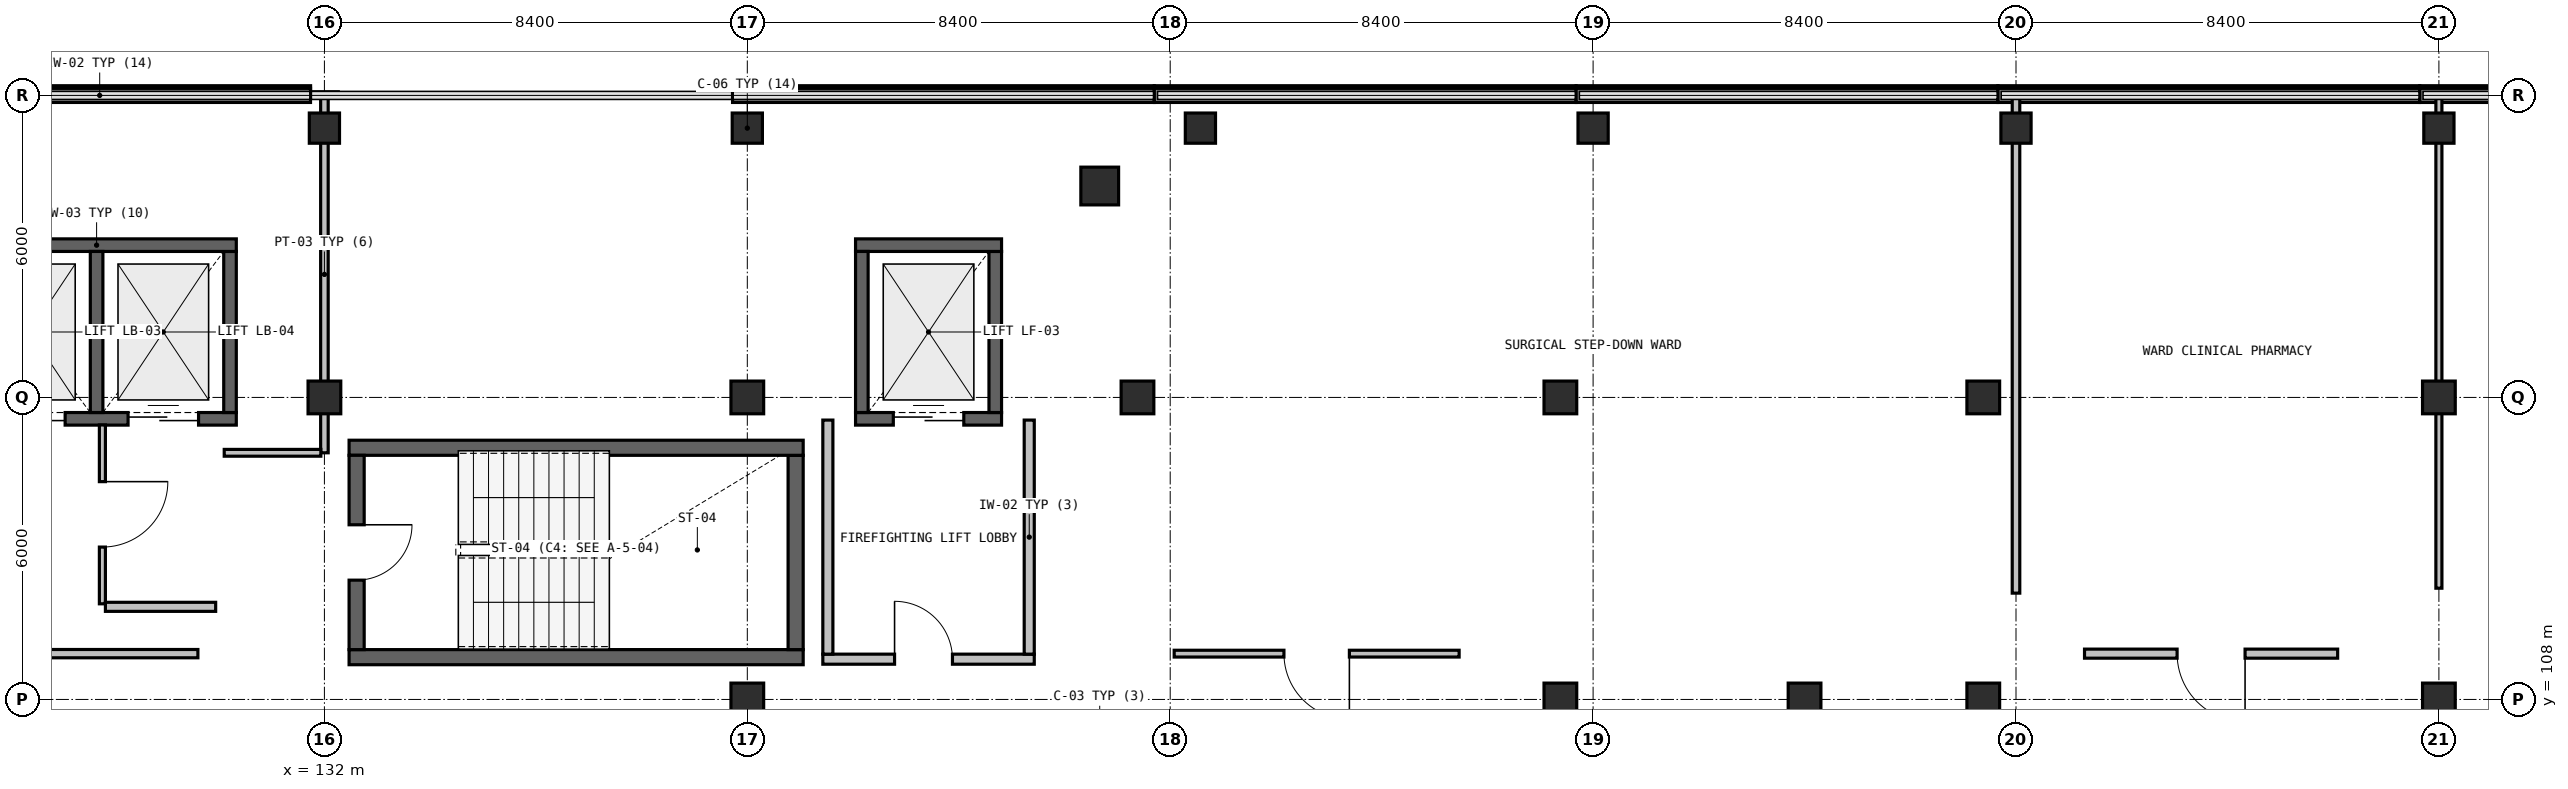
"""IFC4 building model, lengths in metres.
Left out: names, types, materials, properties, quantities, classifications, styles, units other than length and angle.
Written with IfcOpenShell. Run it as: python <this file> out.ifc"""

import sys

from ifc_helpers import new_model, si_unit, direction, frame, frame_2d, origin, origin_2d, place, context, subcontext, project, spatial, rectangle, extrude, element, fill, save


model = new_model("IFC4")
c1 = context("Model", 3, precision=1e-05, world=origin(), true_north=direction((0.0, 1.0)))
c2 = subcontext(c1, "Body", "Model", "MODEL_VIEW")
j1 = project(units=[si_unit("LENGTHUNIT", "METRE"), si_unit("PLANEANGLEUNIT", "RADIAN")], contexts=[c1])
p1 = place(None, origin())
s1 = spatial("IfcSite", under=j1, at=p1, CompositionType="ELEMENT")
p2 = place(p1, origin())
s2 = spatial("IfcBuilding", under=s1, at=p2, CompositionType="ELEMENT")
p3 = place(p2, frame((0.0, 0.0, 23.25)))
s3 = spatial("IfcBuildingStorey", under=s2, at=p3, CompositionType="ELEMENT", Elevation=23.25)
p4 = place(p3, frame((147.4, 118.2, 0.0), z_axis=(0.0, 0.0, 1.0), x_axis=(1.0, 0.0, 0.0)))
e1 = element("IfcColumn", 1, at=p4, inside=s3, PredefinedType="COLUMN", context=c2, shape_type="SweptSolid", body=[
    extrude(rectangle(XDim=0.75, YDim=0.75, at=origin_2d()), origin(), (0.0, 0.0, 1.0), 4.05),
])
p5 = place(p3, frame((161.4, 108.0, 0.0), z_axis=(0.0, 0.0, 1.0), x_axis=(1.0, 0.0, 0.0)))
e2 = element("IfcColumn", 2, at=p5, inside=s3, PredefinedType="COLUMN", context=c2, shape_type="SweptSolid", body=[
    extrude(rectangle(XDim=0.65, YDim=0.65, at=origin_2d()), origin(), (0.0, 0.0, 1.0), 4.05),
])
for number, where, z_axis, x_axis in (
    (3, (149.4, 119.35, 0.0), (0.0, 0.0, 1.0), (1.0, 0.0, 0.0)),
    (4, (157.2, 119.35, 0.0), (0.0, 0.0, 1.0), (1.0, 0.0, 0.0)),
    (5, (165.6, 119.35, 0.0), (0.0, 0.0, 1.0), (1.0, 0.0, 0.0)),
    (6, (174.0, 119.35, 0.0), (0.0, 0.0, 1.0), (1.0, 0.0, 0.0)),
):
    element("IfcColumn", number, at=place(p3, frame(where, z_axis=z_axis, x_axis=x_axis)), inside=s3, PredefinedType="COLUMN", context=c2, shape_type="SweptSolid", body=[
        extrude(rectangle(XDim=0.6, YDim=0.6, at=origin_2d()), origin(), (0.0, 0.0, 1.0), 3.775),
    ])
p6 = place(p3, frame((132.0, 114.0, 0.0), z_axis=(0.0, 0.0, 1.0), x_axis=(1.0, 0.0, 0.0)))
e7 = element("IfcColumn", 7, at=p6, inside=s3, PredefinedType="COLUMN", context=c2, shape_type="SweptSolid", body=[
    extrude(rectangle(XDim=0.65, YDim=0.65, at=origin_2d()), origin(), (0.0, 0.0, 1.0), 4.05),
])
p7 = place(p3, frame((132.0, 119.35, 0.0), z_axis=(0.0, 0.0, 1.0), x_axis=(1.0, 0.0, 0.0)))
e8 = element("IfcColumn", 8, at=p7, inside=s3, PredefinedType="COLUMN", context=c2, shape_type="SweptSolid", body=[
    extrude(rectangle(XDim=0.6, YDim=0.6, at=origin_2d()), origin(), (0.0, 0.0, 1.0), 4.05),
])
for number, where, z_axis, x_axis in (
    (9, (140.4, 108.0, 0.0), (0.0, 0.0, 1.0), (1.0, 0.0, 0.0)),
    (10, (140.4, 114.0, 0.0), (0.0, 0.0, 1.0), (1.0, 0.0, 0.0)),
):
    element("IfcColumn", number, at=place(p3, frame(where, z_axis=z_axis, x_axis=x_axis)), inside=s3, PredefinedType="COLUMN", context=c2, shape_type="SweptSolid", body=[
        extrude(rectangle(XDim=0.65, YDim=0.65, at=origin_2d()), origin(), (0.0, 0.0, 1.0), 4.05),
    ])
p8 = place(p3, frame((140.4, 119.35, 0.0), z_axis=(0.0, 0.0, 1.0), x_axis=(1.0, 0.0, 0.0)))
e11 = element("IfcColumn", 11, at=p8, inside=s3, PredefinedType="COLUMN", context=c2, shape_type="SweptSolid", body=[
    extrude(rectangle(XDim=0.6, YDim=0.6, at=origin_2d()), origin(), (0.0, 0.0, 1.0), 4.05),
])
for number, where, z_axis, x_axis in (
    (12, (148.15, 114.0, 0.0), (0.0, 0.0, 1.0), (1.0, 0.0, 0.0)),
    (13, (156.55, 108.0, 0.0), (0.0, 0.0, 1.0), (1.0, 0.0, 0.0)),
    (14, (156.55, 114.0, 0.0), (0.0, 0.0, 1.0), (1.0, 0.0, 0.0)),
    (15, (164.95, 108.0, 0.0), (0.0, 0.0, 1.0), (1.0, 0.0, 0.0)),
    (16, (164.95, 114.0, 0.0), (0.0, 0.0, 1.0), (1.0, 0.0, 0.0)),
    (17, (174.0, 108.0, 0.0), (0.0, 0.0, 1.0), (1.0, 0.0, 0.0)),
    (18, (174.0, 114.0, 0.0), (0.0, 0.0, 1.0), (1.0, 0.0, 0.0)),
):
    element("IfcColumn", number, at=place(p3, frame(where, z_axis=z_axis, x_axis=x_axis)), inside=s3, PredefinedType="COLUMN", context=c2, shape_type="SweptSolid", body=[
        extrude(rectangle(XDim=0.65, YDim=0.65, at=origin_2d()), origin(), (0.0, 0.0, 1.0), 4.05),
    ])
p9 = place(p3, frame((123.349, 120.0, 0.0), z_axis=(0.0, 0.0, 1.0), x_axis=(1.0, 0.0, 0.0)))
e19 = element("IfcWall", 19, at=p9, inside=s3, PredefinedType="SOLIDWALL", context=c2, shape_type="SweptSolid", body=[
    extrude(rectangle(XDim=8.375, YDim=0.28, at=frame_2d((4.188, 0.0))), origin(), (0.0, 0.0, 1.0), 0.94),
])
p10 = place(p3, frame((140.107, 120.0, 0.0), z_axis=(0.0, 0.0, 1.0), x_axis=(1.0, 0.0, 0.0)))
e20 = element("IfcWall", 20, at=p10, inside=s3, PredefinedType="SOLIDWALL", context=c2, shape_type="SweptSolid", body=[
    extrude(rectangle(XDim=8.374, YDim=0.28, at=frame_2d((4.187, 0.0))), origin(), (0.0, 0.0, 1.0), 0.94),
])
for number, where, z_axis, x_axis in (
    (21, (148.485, 120.0, 0.0), (0.0, 0.0, 1.0), (1.0, 0.0, 0.0)),
    (22, (156.864, 120.0, 0.0), (0.0, 0.0, 1.0), (1.0, 0.0, 0.0)),
    (23, (165.243, 120.0, 0.0), (0.0, 0.0, 1.0), (1.0, 0.0, 0.0)),
):
    element("IfcWall", number, at=place(p3, frame(where, z_axis=z_axis, x_axis=x_axis)), inside=s3, PredefinedType="SOLIDWALL", context=c2, shape_type="SweptSolid", body=[
        extrude(rectangle(XDim=8.375, YDim=0.28, at=frame_2d((4.188, 0.0))), origin(), (0.0, 0.0, 1.0), 0.94),
    ])
p11 = place(p3, frame((173.622, 120.0, 0.0), z_axis=(0.0, 0.0, 1.0), x_axis=(1.0, 0.0, 0.0)))
e24 = element("IfcWall", 24, at=p11, inside=s3, PredefinedType="SOLIDWALL", context=c2, shape_type="SweptSolid", body=[
    extrude(rectangle(XDim=8.237, YDim=0.28, at=frame_2d((4.118, 0.0))), origin(), (0.0, 0.0, 1.0), 0.94),
])
p12 = place(p3, frame((132.49, 108.84, 0.0), z_axis=(0.0, 0.0, 1.0), x_axis=(1.0, 0.0, 0.0)))
e25 = element("IfcWall", 25, at=p12, inside=s3, PredefinedType="SHEAR", context=c2, shape_type="SweptSolid", body=[
    extrude(rectangle(XDim=9.02, YDim=0.3, at=frame_2d((4.51, 0.0))), origin(), (0.0, 0.0, 1.0), 3.775),
])
p13 = place(p3, frame((141.36, 108.99, 0.0), z_axis=(0.0, 0.0, 1.0), x_axis=(0.0, 1.0, 0.0)))
e26 = element("IfcWall", 26, at=p13, inside=s3, PredefinedType="SHEAR", context=c2, shape_type="SweptSolid", body=[
    extrude(rectangle(XDim=3.86, YDim=0.3, at=frame_2d((1.93, 0.0))), origin(), (0.0, 0.0, 1.0), 3.775),
])
p14 = place(p3, frame((141.51, 113.0, 0.0), z_axis=(0.0, 0.0, 1.0), x_axis=(-1.0, 0.0, 0.0)))
e27 = element("IfcWall", 27, at=p14, inside=s3, PredefinedType="SHEAR", context=c2, shape_type="SweptSolid", body=[
    extrude(rectangle(XDim=9.02, YDim=0.3, at=frame_2d((4.51, 0.0))), origin(), (0.0, 0.0, 1.0), 3.775),
])
p15 = place(p3, frame((132.64, 112.85, 0.0), z_axis=(0.0, 0.0, 1.0), x_axis=(0.0, -1.0, 0.0)))
e28 = element("IfcWall", 28, at=p15, inside=s3, PredefinedType="SHEAR", context=c2, shape_type="SweptSolid", body=[
    extrude(rectangle(XDim=3.86, YDim=0.3, at=frame_2d((1.93, 0.0))), origin(), (0.0, 0.0, 1.0), 3.775),
])
p16 = place(p15, frame((1.38, 0.0, 0.0)))
e29 = element("IfcOpeningElement", 29, at=p16, cuts=e28, PredefinedType="OPENING", context=c2, shape_type="SweptSolid", body=[
    extrude(rectangle(XDim=1.1, YDim=2.15, at=frame_2d((0.55, 1.075))), frame((0.0, 0.16, 0.0), z_axis=(0.0, -1.0, 0.0), x_axis=(1.0, 0.0, 0.0)), (0.0, 0.0, 1.0), 0.32),
])
p17 = place(p3, frame((141.9, 108.8, 0.0), z_axis=(0.0, 0.0, 1.0), x_axis=(1.0, 0.0, 0.0)))
e30 = element("IfcWall", 30, at=p17, inside=s3, PredefinedType="SOLIDWALL", context=c2, shape_type="SweptSolid", body=[
    extrude(rectangle(XDim=4.2, YDim=0.2, at=frame_2d((2.1, 0.0))), origin(), (0.0, 0.0, 1.0), 3.775),
])
p18 = place(p17, frame((1.425, 0.0, 0.0)))
e31 = element("IfcOpeningElement", 31, at=p18, cuts=e30, PredefinedType="OPENING", context=c2, shape_type="SweptSolid", body=[
    extrude(rectangle(XDim=1.15, YDim=2.15, at=frame_2d((0.575, 1.075))), frame((0.0, 0.11, 0.0), z_axis=(0.0, -1.0, 0.0), x_axis=(1.0, 0.0, 0.0)), (0.0, 0.0, 1.0), 0.22),
])
for number, where, z_axis, x_axis in (
    (32, (146.0, 108.9, 0.0), (0.0, 0.0, 1.0), (0.0, 1.0, 0.0)),
    (33, (142.0, 113.55, 0.0), (0.0, 0.0, 1.0), (0.0, -1.0, 0.0)),
):
    element("IfcWall", number, at=place(p3, frame(where, z_axis=z_axis, x_axis=x_axis)), inside=s3, PredefinedType="SOLIDWALL", context=c2, shape_type="SweptSolid", body=[
        extrude(rectangle(XDim=4.65, YDim=0.2, at=frame_2d((2.325, 0.0))), origin(), (0.0, 0.0, 1.0), 3.775),
    ])
p19 = place(p3, frame((124.7, 113.575, 0.0), z_axis=(0.0, 0.0, 1.0), x_axis=(1.0, 0.0, 0.0)))
e34 = element("IfcWall", 34, at=p19, inside=s3, PredefinedType="SHEAR", context=c2, shape_type="SweptSolid", body=[
    extrude(rectangle(XDim=5.55, YDim=0.25, at=frame_2d((2.775, 0.0))), origin(), (0.0, 0.0, 1.0), 3.775),
])
p20 = place(p19, frame((0.75, 0.0, 0.0)))
e35 = element("IfcOpeningElement", 35, at=p20, cuts=e34, PredefinedType="OPENING", context=c2, shape_type="SweptSolid", body=[
    extrude(rectangle(XDim=1.4, YDim=2.2, at=frame_2d((0.7, 1.1))), frame((0.0, 0.135, 0.0), z_axis=(0.0, -1.0, 0.0), x_axis=(1.0, 0.0, 0.0)), (0.0, 0.0, 1.0), 0.27),
])
p21 = place(p19, frame((3.4, 0.0, 0.0)))
e36 = element("IfcOpeningElement", 36, at=p21, cuts=e34, PredefinedType="OPENING", context=c2, shape_type="SweptSolid", body=[
    extrude(rectangle(XDim=1.4, YDim=2.2, at=frame_2d((0.7, 1.1))), frame((0.0, 0.135, 0.0), z_axis=(0.0, -1.0, 0.0), x_axis=(1.0, 0.0, 0.0)), (0.0, 0.0, 1.0), 0.27),
])
p22 = place(p3, frame((130.125, 113.7, 0.0), z_axis=(0.0, 0.0, 1.0), x_axis=(0.0, 1.0, 0.0)))
e37 = element("IfcWall", 37, at=p22, inside=s3, PredefinedType="SHEAR", context=c2, shape_type="SweptSolid", body=[
    extrude(rectangle(XDim=3.2, YDim=0.25, at=frame_2d((1.6, 0.0))), origin(), (0.0, 0.0, 1.0), 3.775),
])
p23 = place(p3, frame((130.25, 117.025, 0.0), z_axis=(0.0, 0.0, 1.0), x_axis=(-1.0, 0.0, 0.0)))
e38 = element("IfcWall", 38, at=p23, inside=s3, PredefinedType="SHEAR", context=c2, shape_type="SweptSolid", body=[
    extrude(rectangle(XDim=5.55, YDim=0.25, at=frame_2d((2.775, 0.0))), origin(), (0.0, 0.0, 1.0), 3.775),
])
p24 = place(p3, frame((127.475, 113.7, 0.0), z_axis=(0.0, 0.0, 1.0), x_axis=(0.0, 1.0, 0.0)))
e39 = element("IfcWall", 39, at=p24, inside=s3, PredefinedType="SHEAR", context=c2, shape_type="SweptSolid", body=[
    extrude(rectangle(XDim=3.2, YDim=0.25, at=frame_2d((1.6, 0.0))), origin(), (0.0, 0.0, 1.0), 3.775),
])
p25 = place(p3, frame((142.55, 113.575, 0.0), z_axis=(0.0, 0.0, 1.0), x_axis=(1.0, 0.0, 0.0)))
e40 = element("IfcWall", 40, at=p25, inside=s3, PredefinedType="SHEAR", context=c2, shape_type="SweptSolid", body=[
    extrude(rectangle(XDim=2.9, YDim=0.25, at=frame_2d((1.45, 0.0))), origin(), (0.0, 0.0, 1.0), 3.775),
])
p26 = place(p25, frame((0.75, 0.0, 0.0)))
e41 = element("IfcOpeningElement", 41, at=p26, cuts=e40, PredefinedType="OPENING", context=c2, shape_type="SweptSolid", body=[
    extrude(rectangle(XDim=1.4, YDim=2.15, at=frame_2d((0.7, 1.075))), frame((0.0, 0.135, 0.0), z_axis=(0.0, -1.0, 0.0), x_axis=(1.0, 0.0, 0.0)), (0.0, 0.0, 1.0), 0.27),
])
p27 = place(p3, frame((145.325, 113.7, 0.0), z_axis=(0.0, 0.0, 1.0), x_axis=(0.0, 1.0, 0.0)))
e42 = element("IfcWall", 42, at=p27, inside=s3, PredefinedType="SHEAR", context=c2, shape_type="SweptSolid", body=[
    extrude(rectangle(XDim=3.2, YDim=0.25, at=frame_2d((1.6, 0.0))), origin(), (0.0, 0.0, 1.0), 3.775),
])
p28 = place(p3, frame((145.45, 117.025, 0.0), z_axis=(0.0, 0.0, 1.0), x_axis=(-1.0, 0.0, 0.0)))
e43 = element("IfcWall", 43, at=p28, inside=s3, PredefinedType="SHEAR", context=c2, shape_type="SweptSolid", body=[
    extrude(rectangle(XDim=2.9, YDim=0.25, at=frame_2d((1.45, 0.0))), origin(), (0.0, 0.0, 1.0), 3.775),
])
p29 = place(p3, frame((142.675, 116.9, 0.0), z_axis=(0.0, 0.0, 1.0), x_axis=(0.0, -1.0, 0.0)))
e44 = element("IfcWall", 44, at=p29, inside=s3, PredefinedType="SHEAR", context=c2, shape_type="SweptSolid", body=[
    extrude(rectangle(XDim=3.2, YDim=0.25, at=frame_2d((1.6, 0.0))), origin(), (0.0, 0.0, 1.0), 3.775),
])
p30 = place(p3, frame((132.0, 119.989, 0.0), z_axis=(0.0, 0.0, 1.0), x_axis=(0.0, -1.0, 0.0)))
e45 = element("IfcWall", 45, at=p30, inside=s3, PredefinedType="PARTITIONING", context=c2, shape_type="SweptSolid", body=[
    extrude(rectangle(XDim=7.089, YDim=0.15, at=frame_2d((3.544, 0.0))), origin(), (0.0, 0.0, 1.0), 3.175),
])
p31 = place(p3, frame((131.929, 112.9, 0.0), z_axis=(0.0, 0.0, 1.0), x_axis=(-1.0, 0.0, 0.0)))
e46 = element("IfcWall", 46, at=p31, inside=s3, PredefinedType="PARTITIONING", context=c2, shape_type="SweptSolid", body=[
    extrude(rectangle(XDim=1.919, YDim=0.135, at=frame_2d((0.959, 0.0))), origin(), (0.0, 0.0, 1.0), 3.775),
])
p32 = place(p3, frame((127.59, 113.453, 0.0), z_axis=(0.0, 0.0, 1.0), x_axis=(0.0, -1.0, 0.0)))
e47 = element("IfcWall", 47, at=p32, inside=s3, PredefinedType="PARTITIONING", context=c2, shape_type="SweptSolid", body=[
    extrude(rectangle(XDim=3.553, YDim=0.12, at=frame_2d((1.776, 0.0))), origin(), (0.0, 0.0, 1.0), 3.775),
])
p33 = place(p32, frame((1.126, 0.0, 0.0)))
e48 = element("IfcOpeningElement", 48, at=p33, cuts=e47, PredefinedType="OPENING", context=c2, shape_type="SweptSolid", body=[
    extrude(rectangle(XDim=1.3, YDim=2.15, at=frame_2d((0.65, 1.075))), frame((0.0, 0.07, 0.0), z_axis=(0.0, -1.0, 0.0), x_axis=(1.0, 0.0, 0.0)), (0.0, 0.0, 1.0), 0.14),
])
p34 = place(p3, frame((127.65, 109.84, 0.0), z_axis=(0.0, 0.0, 1.0), x_axis=(1.0, 0.0, 0.0)))
e49 = element("IfcWall", 49, at=p34, inside=s3, PredefinedType="PARTITIONING", context=c2, shape_type="SweptSolid", body=[
    extrude(rectangle(XDim=2.19, YDim=0.18, at=frame_2d((1.095, 0.0))), origin(), (0.0, 0.0, 1.0), 3.775),
])
p35 = place(p3, frame((129.487, 108.91, 0.0), z_axis=(0.0, 0.0, 1.0), x_axis=(-1.0, 0.0, 0.0)))
e50 = element("IfcWall", 50, at=p35, inside=s3, PredefinedType="PARTITIONING", context=c2, shape_type="SweptSolid", body=[
    extrude(rectangle(XDim=3.876, YDim=0.165, at=frame_2d((1.938, 0.0))), origin(), (0.0, 0.0, 1.0), 3.775),
])
p36 = place(p3, frame((165.6, 119.958, 0.0), z_axis=(0.0, 0.0, 1.0), x_axis=(0.0, -1.0, 0.0)))
e51 = element("IfcWall", 51, at=p36, inside=s3, PredefinedType="PARTITIONING", context=c2, shape_type="SweptSolid", body=[
    extrude(rectangle(XDim=9.846, YDim=0.15, at=frame_2d((4.923, 0.0))), origin(), (0.0, 0.0, 1.0), 3.775),
])
p37 = place(p3, frame((154.539, 108.91, 0.0), z_axis=(0.0, 0.0, 1.0), x_axis=(-1.0, 0.0, 0.0)))
e52 = element("IfcWall", 52, at=p37, inside=s3, PredefinedType="PARTITIONING", context=c2, shape_type="SweptSolid", body=[
    extrude(rectangle(XDim=5.66, YDim=0.135, at=frame_2d((2.83, 0.0))), origin(), (0.0, 0.0, 1.0), 3.775),
])
p38 = place(p37, frame((2.18, 0.0, 0.0)))
e53 = element("IfcOpeningElement", 53, at=p38, cuts=e52, PredefinedType="OPENING", context=c2, shape_type="SweptSolid", body=[
    extrude(rectangle(XDim=1.3, YDim=2.15, at=frame_2d((0.65, 1.075))), frame((0.0, 0.077, 0.0), z_axis=(0.0, -1.0, 0.0), x_axis=(1.0, 0.0, 0.0)), (0.0, 0.0, 1.0), 0.155),
])
p39 = place(p3, frame((174.0, 119.958, 0.0), z_axis=(0.0, 0.0, 1.0), x_axis=(0.0, -1.0, 0.0)))
e54 = element("IfcWall", 54, at=p39, inside=s3, PredefinedType="PARTITIONING", context=c2, shape_type="SweptSolid", body=[
    extrude(rectangle(XDim=9.748, YDim=0.12, at=frame_2d((4.874, 0.0))), origin(), (0.0, 0.0, 1.0), 3.175),
])
p40 = place(p3, frame((171.989, 108.91, 0.0), z_axis=(0.0, 0.0, 1.0), x_axis=(-1.0, 0.0, 0.0)))
e55 = element("IfcWall", 55, at=p40, inside=s3, PredefinedType="PARTITIONING", context=c2, shape_type="SweptSolid", body=[
    extrude(rectangle(XDim=5.028, YDim=0.18, at=frame_2d((2.514, 0.0))), origin(), (0.0, 0.0, 1.0), 3.775),
])
p41 = place(p40, frame((1.839, 0.0, 0.0)))
e56 = element("IfcOpeningElement", 56, at=p41, cuts=e55, PredefinedType="OPENING", context=c2, shape_type="SweptSolid", body=[
    extrude(rectangle(XDim=1.35, YDim=2.15, at=frame_2d((0.675, 1.075))), frame((0.0, 0.1, 0.0), z_axis=(0.0, -1.0, 0.0), x_axis=(1.0, 0.0, 0.0)), (0.0, 0.0, 1.0), 0.2),
])
p42 = place(p16, origin())
e57 = element("IfcDoor", 57, at=p42, inside=s3, OperationType="SINGLE_SWING_RIGHT", PredefinedType="DOOR", context=c2, shape_type="SweptSolid", body=[
    extrude(rectangle(XDim=1.1, YDim=2.15, at=frame_2d((0.55, 1.075))), frame((0.0, 0.025, 0.0), z_axis=(0.0, -1.0, 0.0), x_axis=(1.0, 0.0, 0.0)), (0.0, 0.0, 1.0), 0.05),
])
fill(e29, e57)
p43 = place(p18, origin())
e58 = element("IfcDoor", 58, at=p43, inside=s3, OperationType="SINGLE_SWING_LEFT", PredefinedType="DOOR", context=c2, shape_type="SweptSolid", body=[
    extrude(rectangle(XDim=1.15, YDim=2.15, at=frame_2d((0.575, 1.075))), frame((0.0, 0.025, 0.0), z_axis=(0.0, -1.0, 0.0), x_axis=(1.0, 0.0, 0.0)), (0.0, 0.0, 1.0), 0.05),
])
fill(e31, e58)
p44 = place(p20, origin())
e59 = element("IfcDoor", 59, at=p44, inside=s3, OperationType="DOUBLE_DOOR_SLIDING", PredefinedType="DOOR", context=c2, shape_type="SweptSolid", body=[
    extrude(rectangle(XDim=1.4, YDim=2.2, at=frame_2d((0.7, 1.1))), frame((0.0, 0.025, 0.0), z_axis=(0.0, -1.0, 0.0), x_axis=(1.0, 0.0, 0.0)), (0.0, 0.0, 1.0), 0.05),
])
fill(e35, e59)
p45 = place(p21, origin())
e60 = element("IfcDoor", 60, at=p45, inside=s3, OperationType="DOUBLE_DOOR_SLIDING", PredefinedType="DOOR", context=c2, shape_type="SweptSolid", body=[
    extrude(rectangle(XDim=1.4, YDim=2.2, at=frame_2d((0.7, 1.1))), frame((0.0, 0.025, 0.0), z_axis=(0.0, -1.0, 0.0), x_axis=(1.0, 0.0, 0.0)), (0.0, 0.0, 1.0), 0.05),
])
fill(e36, e60)
p46 = place(p26, origin())
e61 = element("IfcDoor", 61, at=p46, inside=s3, OperationType="DOUBLE_DOOR_SLIDING", PredefinedType="DOOR", context=c2, shape_type="SweptSolid", body=[
    extrude(rectangle(XDim=1.4, YDim=2.15, at=frame_2d((0.7, 1.075))), frame((0.0, 0.025, 0.0), z_axis=(0.0, -1.0, 0.0), x_axis=(1.0, 0.0, 0.0)), (0.0, 0.0, 1.0), 0.05),
])
fill(e41, e61)
p47 = place(p33, origin())
e62 = element("IfcDoor", 62, at=p47, inside=s3, OperationType="SINGLE_SWING_RIGHT", PredefinedType="DOOR", context=c2, shape_type="SweptSolid", body=[
    extrude(rectangle(XDim=1.3, YDim=2.15, at=frame_2d((0.65, 1.075))), frame((0.0, 0.025, 0.0), z_axis=(0.0, -1.0, 0.0), x_axis=(1.0, 0.0, 0.0)), (0.0, 0.0, 1.0), 0.05),
])
fill(e48, e62)
p48 = place(p38, origin())
e63 = element("IfcDoor", 63, at=p48, inside=s3, OperationType="SINGLE_SWING_LEFT", PredefinedType="DOOR", context=c2, shape_type="SweptSolid", body=[
    extrude(rectangle(XDim=1.3, YDim=2.15, at=frame_2d((0.65, 1.075))), frame((0.0, 0.025, 0.0), z_axis=(0.0, -1.0, 0.0), x_axis=(1.0, 0.0, 0.0)), (0.0, 0.0, 1.0), 0.05),
])
fill(e53, e63)
p49 = place(p41, origin())
e64 = element("IfcDoor", 64, at=p49, inside=s3, OperationType="SINGLE_SWING_RIGHT", PredefinedType="DOOR", context=c2, shape_type="SweptSolid", body=[
    extrude(rectangle(XDim=1.35, YDim=2.15, at=frame_2d((0.675, 1.075))), frame((0.0, 0.025, 0.0), z_axis=(0.0, -1.0, 0.0), x_axis=(1.0, 0.0, 0.0)), (0.0, 0.0, 1.0), 0.05),
])
fill(e56, e64)
save(model, sys.argv[1])
